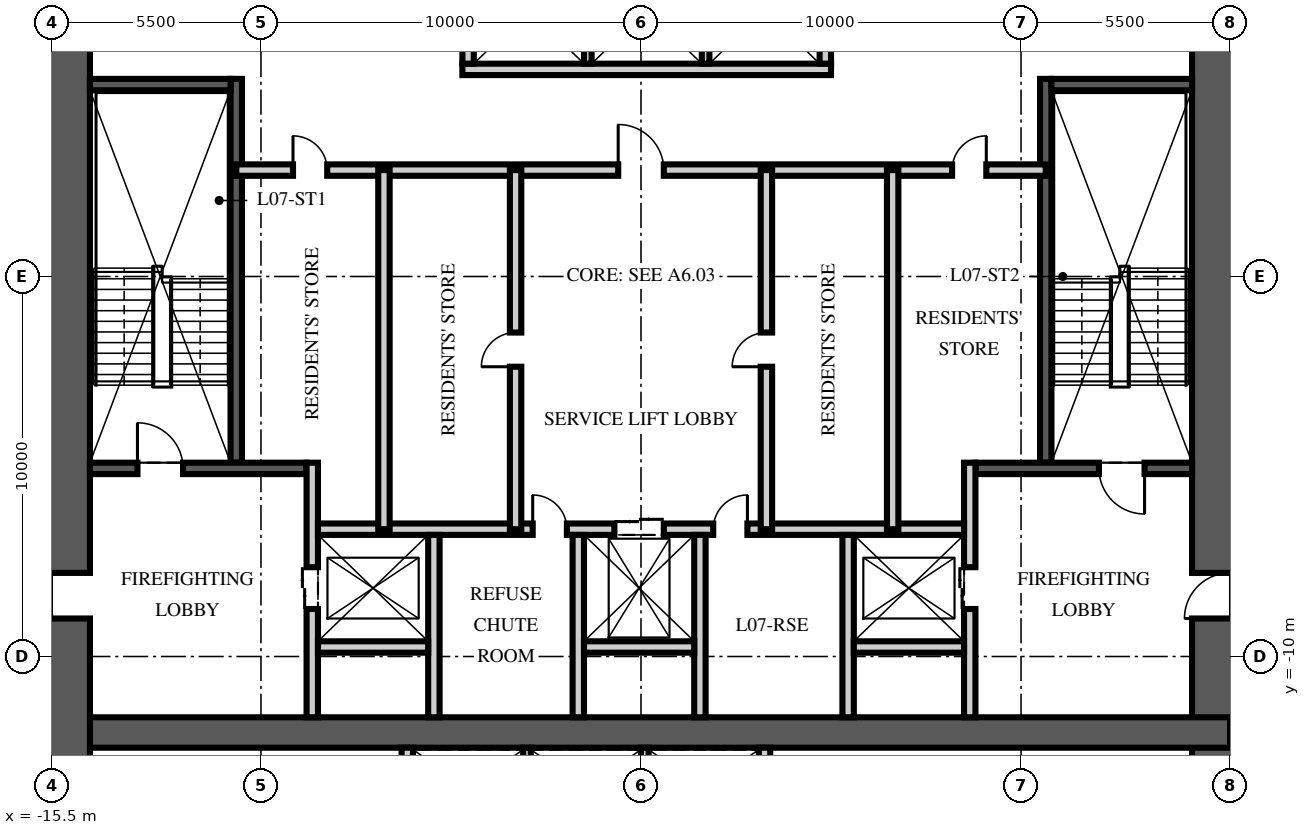
"""IFC4 building model, lengths in metres.
Left out: names, types, materials, properties, quantities, classifications, styles, units other than length and angle.
Written with IfcOpenShell. Run it as: python <this file> out.ifc"""

import sys

from ifc_helpers import new_model, si_unit, direction, frame, frame_2d, origin, place, context, subcontext, project, spatial, rectangle, extrude, element, fill, save


model = new_model("IFC4")
c1 = context("Model", 3, precision=1e-05, world=origin(), true_north=direction((0.0, 1.0)))
c2 = subcontext(c1, "Body", "Model", "MODEL_VIEW")
j1 = project(units=[si_unit("LENGTHUNIT", "METRE"), si_unit("PLANEANGLEUNIT", "RADIAN")], contexts=[c1])
p1 = place(None, origin())
s1 = spatial("IfcSite", under=j1, at=p1, CompositionType="ELEMENT")
p2 = place(p1, origin())
s2 = spatial("IfcBuilding", under=s1, at=p2, CompositionType="ELEMENT")
p3 = place(p2, frame((0.0, 0.0, 32.25)))
s3 = spatial("IfcBuildingStorey", under=s2, at=p3, CompositionType="ELEMENT", Elevation=32.25)
p4 = place(p3, frame((15.5, -15.5, -0.25), z_axis=(0.0, 0.0, 1.0), x_axis=(0.0, 1.0, 0.0)))
e1 = element("IfcWall", 1, at=p4, inside=s3, PredefinedType="SHEAR", context=c2, shape_type="SweptSolid", body=[
    extrude(rectangle(XDim=31.0, YDim=2.0, at=frame_2d((15.5, 0.0))), origin(), (0.0, 0.0, 1.0), 3.75),
])
p5 = place(p4, frame((6.5, 0.0, 0.25)))
e2 = element("IfcOpeningElement", 2, at=p5, cuts=e1, PredefinedType="OPENING", context=c2, shape_type="SweptSolid", body=[
    extrude(rectangle(XDim=1.2, YDim=2.1, at=frame_2d((0.6, 1.05))), frame((0.0, 1.01, 0.0), z_axis=(0.0, -1.0, 0.0), x_axis=(1.0, 0.0, 0.0)), (0.0, 0.0, 1.0), 2.02),
])
p6 = place(p4, frame((23.0, 0.0, 0.25)))
e3 = element("IfcOpeningElement", 3, at=p6, cuts=e1, PredefinedType="OPENING", context=c2, shape_type="SweptSolid", body=[
    extrude(rectangle(XDim=1.8, YDim=2.1, at=frame_2d((0.9, 1.05))), frame((0.0, 1.01, 0.0), z_axis=(0.0, -1.0, 0.0), x_axis=(1.0, 0.0, 0.0)), (0.0, 0.0, 1.0), 2.02),
])
p7 = place(p3, frame((-15.5, -12.0, -0.25), z_axis=(0.0, 0.0, 1.0), x_axis=(1.0, 0.0, 0.0)))
e4 = element("IfcWall", 4, at=p7, inside=s3, PredefinedType="SHEAR", context=c2, shape_type="SweptSolid", body=[
    extrude(rectangle(XDim=31.0, YDim=0.8, at=frame_2d((15.5, 0.0))), origin(), (0.0, 0.0, 1.0), 3.75),
])
p8 = place(p3, frame((-15.5, -15.5, -0.25), z_axis=(0.0, 0.0, 1.0), x_axis=(0.0, 1.0, 0.0)))
e5 = element("IfcWall", 5, at=p8, inside=s3, PredefinedType="SHEAR", context=c2, shape_type="SweptSolid", body=[
    extrude(rectangle(XDim=31.0, YDim=2.0, at=frame_2d((15.5, 0.0))), origin(), (0.0, 0.0, 1.0), 3.75),
])
p9 = place(p8, frame((6.5, 0.0, 0.25)))
e6 = element("IfcOpeningElement", 6, at=p9, cuts=e5, PredefinedType="OPENING", context=c2, shape_type="SweptSolid", body=[
    extrude(rectangle(XDim=1.2, YDim=2.1, at=frame_2d((0.6, 1.05))), frame((0.0, 1.01, 0.0), z_axis=(0.0, -1.0, 0.0), x_axis=(1.0, 0.0, 0.0)), (0.0, 0.0, 1.0), 2.02),
])
p10 = place(p8, frame((23.0, 0.0, 0.25)))
e7 = element("IfcOpeningElement", 7, at=p10, cuts=e5, PredefinedType="OPENING", context=c2, shape_type="SweptSolid", body=[
    extrude(rectangle(XDim=1.8, YDim=2.1, at=frame_2d((0.9, 1.05))), frame((0.0, 1.01, 0.0), z_axis=(0.0, -1.0, 0.0), x_axis=(1.0, 0.0, 0.0)), (0.0, 0.0, 1.0), 2.02),
])
p11 = place(p3, frame((-10.65, -4.9, 0.0), z_axis=(0.0, 0.0, 1.0), x_axis=(0.0, 1.0, 0.0)))
e8 = element("IfcWall", 8, at=p11, inside=s3, PredefinedType="SOLIDWALL", context=c2, shape_type="SweptSolid", body=[
    extrude(rectangle(XDim=10.1, YDim=0.3, at=frame_2d((5.05, 0.0))), origin(), (0.0, 0.0, 1.0), 3.5),
])
p12 = place(p3, frame((-14.5, -5.05, 0.0), z_axis=(0.0, 0.0, 1.0), x_axis=(1.0, 0.0, 0.0)))
e9 = element("IfcWall", 9, at=p12, inside=s3, PredefinedType="SOLIDWALL", context=c2, shape_type="SweptSolid", body=[
    extrude(rectangle(XDim=5.7, YDim=0.3, at=frame_2d((2.85, 0.0))), origin(), (0.0, 0.0, 1.0), 3.5),
])
p13 = place(p12, frame((1.25, 0.0, 0.0)))
e10 = element("IfcOpeningElement", 10, at=p13, cuts=e9, PredefinedType="OPENING", context=c2, shape_type="SweptSolid", body=[
    extrude(rectangle(XDim=1.2, YDim=2.1, at=frame_2d((0.6, 1.05))), frame((0.0, 0.16, 0.0), z_axis=(0.0, -1.0, 0.0), x_axis=(1.0, 0.0, 0.0)), (0.0, 0.0, 1.0), 0.32),
])
p14 = place(p3, frame((-14.5, 5.05, 0.0), z_axis=(0.0, 0.0, 1.0), x_axis=(1.0, 0.0, 0.0)))
e11 = element("IfcWall", 11, at=p14, inside=s3, PredefinedType="SOLIDWALL", context=c2, shape_type="SweptSolid", body=[
    extrude(rectangle(XDim=3.7, YDim=0.3, at=frame_2d((1.85, 0.0))), origin(), (0.0, 0.0, 1.0), 3.5),
])
p15 = place(p3, frame((-8.65, -11.6, 0.0), z_axis=(0.0, 0.0, 1.0), x_axis=(0.0, 1.0, 0.0)))
e12 = element("IfcWall", 12, at=p15, inside=s3, PredefinedType="PARTITIONING", context=c2, shape_type="SweptSolid", body=[
    extrude(rectangle(XDim=6.7, YDim=0.3, at=frame_2d((3.35, 0.0))), origin(), (0.0, 0.0, 1.0), 3.5),
])
p16 = place(p15, frame((2.85, 0.0, 0.0)))
e13 = element("IfcOpeningElement", 13, at=p16, cuts=e12, PredefinedType="OPENING", context=c2, shape_type="SweptSolid", body=[
    extrude(rectangle(XDim=1.1, YDim=2.1, at=frame_2d((0.55, 1.05))), frame((0.0, 0.16, 0.0), z_axis=(0.0, -1.0, 0.0), x_axis=(1.0, 0.0, 0.0)), (0.0, 0.0, 1.0), 0.32),
])
p17 = place(p3, frame((10.65, -4.9, 0.0), z_axis=(0.0, 0.0, 1.0), x_axis=(0.0, 1.0, 0.0)))
e14 = element("IfcWall", 14, at=p17, inside=s3, PredefinedType="SOLIDWALL", context=c2, shape_type="SweptSolid", body=[
    extrude(rectangle(XDim=10.1, YDim=0.3, at=frame_2d((5.05, 0.0))), origin(), (0.0, 0.0, 1.0), 3.5),
])
p18 = place(p3, frame((14.5, -5.05, 0.0), z_axis=(0.0, 0.0, 1.0), x_axis=(-1.0, 0.0, 0.0)))
e15 = element("IfcWall", 15, at=p18, inside=s3, PredefinedType="SOLIDWALL", context=c2, shape_type="SweptSolid", body=[
    extrude(rectangle(XDim=5.7, YDim=0.3, at=frame_2d((2.85, 0.0))), origin(), (0.0, 0.0, 1.0), 3.5),
])
p19 = place(p18, frame((1.25, 0.0, 0.0)))
e16 = element("IfcOpeningElement", 16, at=p19, cuts=e15, PredefinedType="OPENING", context=c2, shape_type="SweptSolid", body=[
    extrude(rectangle(XDim=1.2, YDim=2.1, at=frame_2d((0.6, 1.05))), frame((0.0, 0.16, 0.0), z_axis=(0.0, -1.0, 0.0), x_axis=(1.0, 0.0, 0.0)), (0.0, 0.0, 1.0), 0.32),
])
p20 = place(p3, frame((14.5, 5.05, 0.0), z_axis=(0.0, 0.0, 1.0), x_axis=(-1.0, 0.0, 0.0)))
e17 = element("IfcWall", 17, at=p20, inside=s3, PredefinedType="SOLIDWALL", context=c2, shape_type="SweptSolid", body=[
    extrude(rectangle(XDim=3.7, YDim=0.3, at=frame_2d((1.85, 0.0))), origin(), (0.0, 0.0, 1.0), 3.5),
])
p21 = place(p3, frame((8.65, -11.6, 0.0), z_axis=(0.0, 0.0, 1.0), x_axis=(0.0, 1.0, 0.0)))
e18 = element("IfcWall", 18, at=p21, inside=s3, PredefinedType="PARTITIONING", context=c2, shape_type="SweptSolid", body=[
    extrude(rectangle(XDim=6.7, YDim=0.3, at=frame_2d((3.35, 0.0))), origin(), (0.0, 0.0, 1.0), 3.5),
])
p22 = place(p21, frame((2.85, 0.0, 0.0)))
e19 = element("IfcOpeningElement", 19, at=p22, cuts=e18, PredefinedType="OPENING", context=c2, shape_type="SweptSolid", body=[
    extrude(rectangle(XDim=1.1, YDim=2.1, at=frame_2d((0.55, 1.05))), frame((0.0, 0.16, 0.0), z_axis=(0.0, -1.0, 0.0), x_axis=(1.0, 0.0, 0.0)), (0.0, 0.0, 1.0), 0.32),
])
p23 = place(p3, frame((-8.5, -6.65, 0.0), z_axis=(0.0, 0.0, 1.0), x_axis=(1.0, 0.0, 0.0)))
e20 = element("IfcWall", 20, at=p23, inside=s3, PredefinedType="PARTITIONING", context=c2, shape_type="SweptSolid", body=[
    extrude(rectangle(XDim=17.0, YDim=0.3, at=frame_2d((8.5, 0.0))), origin(), (0.0, 0.0, 1.0), 3.5),
])
p24 = place(p23, frame((7.8, 0.0, 0.0)))
e21 = element("IfcOpeningElement", 21, at=p24, cuts=e20, PredefinedType="OPENING", context=c2, shape_type="SweptSolid", body=[
    extrude(rectangle(XDim=1.3, YDim=2.4, at=frame_2d((0.65, 1.2))), frame((0.0, 0.16, 0.0), z_axis=(0.0, -1.0, 0.0), x_axis=(1.0, 0.0, 0.0)), (0.0, 0.0, 1.0), 0.32),
])
p25 = place(p23, frame((5.65, 0.0, 0.0)))
e22 = element("IfcOpeningElement", 22, at=p25, cuts=e20, PredefinedType="OPENING", context=c2, shape_type="SweptSolid", body=[
    extrude(rectangle(XDim=0.9, YDim=2.1, at=frame_2d((0.45, 1.05))), frame((0.0, 0.16, 0.0), z_axis=(0.0, -1.0, 0.0), x_axis=(1.0, 0.0, 0.0)), (0.0, 0.0, 1.0), 0.32),
])
p26 = place(p23, frame((10.4, 0.0, 0.0)))
e23 = element("IfcOpeningElement", 23, at=p26, cuts=e20, PredefinedType="OPENING", context=c2, shape_type="SweptSolid", body=[
    extrude(rectangle(XDim=0.9, YDim=2.1, at=frame_2d((0.45, 1.05))), frame((0.0, 0.16, 0.0), z_axis=(0.0, -1.0, 0.0), x_axis=(1.0, 0.0, 0.0)), (0.0, 0.0, 1.0), 0.32),
])
for number, where, z_axis, x_axis in (
    (24, (-5.45, -11.6, 0.0), (0.0, 0.0, 1.0), (0.0, 1.0, 0.0)),
    (25, (-1.65, -11.6, 0.0), (0.0, 0.0, 1.0), (0.0, 1.0, 0.0)),
    (26, (1.55, -11.6, 0.0), (0.0, 0.0, 1.0), (0.0, 1.0, 0.0)),
    (27, (5.45, -11.6, 0.0), (0.0, 0.0, 1.0), (0.0, 1.0, 0.0)),
):
    element("IfcWall", number, at=place(p3, frame(where, z_axis=z_axis, x_axis=x_axis)), inside=s3, PredefinedType="PARTITIONING", context=c2, shape_type="SweptSolid", body=[
        extrude(rectangle(XDim=4.8, YDim=0.3, at=frame_2d((2.4, 0.0))), origin(), (0.0, 0.0, 1.0), 3.5),
    ])
for number, where, z_axis, x_axis in (
    (28, (-8.5, -9.75, 0.0), (0.0, 0.0, 1.0), (1.0, 0.0, 0.0)),
    (29, (-1.5, -9.75, 0.0), (0.0, 0.0, 1.0), (1.0, 0.0, 0.0)),
    (30, (5.6, -9.75, 0.0), (0.0, 0.0, 1.0), (1.0, 0.0, 0.0)),
):
    element("IfcWall", number, at=place(p3, frame(where, z_axis=z_axis, x_axis=x_axis)), inside=s3, PredefinedType="PARTITIONING", context=c2, shape_type="SweptSolid", body=[
        extrude(rectangle(XDim=2.9, YDim=0.3, at=frame_2d((1.45, 0.0))), origin(), (0.0, 0.0, 1.0), 3.5),
    ])
p27 = place(p3, frame((-4.7, 5.45, 0.0), z_axis=(0.0, 0.0, 1.0), x_axis=(1.0, 0.0, 0.0)))
e31 = element("IfcWall", 31, at=p27, inside=s3, PredefinedType="PARTITIONING", context=c2, shape_type="SweptSolid", body=[
    extrude(rectangle(XDim=9.7, YDim=0.3, at=frame_2d((4.85, 0.0))), origin(), (0.0, 0.0, 1.0), 3.5),
])
for number, where, z_axis, x_axis in (
    (32, (-4.55, 5.6, 0.0), (0.0, 0.0, 1.0), (0.0, 1.0, 0.0)),
    (33, (4.85, 5.6, 0.0), (0.0, 0.0, 1.0), (0.0, 1.0, 0.0)),
):
    element("IfcWall", number, at=place(p3, frame(where, z_axis=z_axis, x_axis=x_axis)), inside=s3, PredefinedType="PARTITIONING", context=c2, shape_type="SweptSolid", body=[
        extrude(rectangle(XDim=2.8, YDim=0.3, at=frame_2d((1.4, 0.0))), origin(), (0.0, 0.0, 1.0), 3.5),
    ])
for number, where, z_axis, x_axis in (
    (34, (-1.4, 5.6, 0.0), (0.0, 0.0, 1.0), (0.0, 1.0, 0.0)),
    (35, (1.7, 5.6, 0.0), (0.0, 0.0, 1.0), (0.0, 1.0, 0.0)),
):
    element("IfcWall", number, at=place(p3, frame(where, z_axis=z_axis, x_axis=x_axis)), inside=s3, PredefinedType="PARTITIONING", context=c2, shape_type="SweptSolid", body=[
        extrude(rectangle(XDim=2.8, YDim=0.2, at=frame_2d((1.4, 0.0))), origin(), (0.0, 0.0, 1.0), 3.5),
    ])
for number, where, z_axis, x_axis in (
    (36, (-6.15, -14.5, 0.0), (0.0, 0.0, 1.0), (0.0, 1.0, 0.0)),
    (37, (3.25, -14.5, 0.0), (0.0, 0.0, 1.0), (0.0, 1.0, 0.0)),
):
    element("IfcWall", number, at=place(p3, frame(where, z_axis=z_axis, x_axis=x_axis)), inside=s3, PredefinedType="PARTITIONING", context=c2, shape_type="SweptSolid", body=[
        extrude(rectangle(XDim=2.1, YDim=0.3, at=frame_2d((1.05, 0.0))), origin(), (0.0, 0.0, 1.0), 3.5),
    ])
for number, where, z_axis, x_axis in (
    (38, (-3.0, -14.5, 0.0), (0.0, 0.0, 1.0), (0.0, 1.0, 0.0)),
    (39, (0.1, -14.5, 0.0), (0.0, 0.0, 1.0), (0.0, 1.0, 0.0)),
):
    element("IfcWall", number, at=place(p3, frame(where, z_axis=z_axis, x_axis=x_axis)), inside=s3, PredefinedType="PARTITIONING", context=c2, shape_type="SweptSolid", body=[
        extrude(rectangle(XDim=2.1, YDim=0.2, at=frame_2d((1.05, 0.0))), origin(), (0.0, 0.0, 1.0), 3.5),
    ])
p28 = place(p3, frame((-10.65, 2.8, 0.0), z_axis=(0.0, 0.0, 1.0), x_axis=(1.0, 0.0, 0.0)))
e40 = element("IfcWall", 40, at=p28, inside=s3, PredefinedType="PARTITIONING", context=c2, shape_type="SweptSolid", body=[
    extrude(rectangle(XDim=21.3, YDim=0.3, at=frame_2d((10.65, 0.0))), origin(), (0.0, 0.0, 1.0), 3.5),
])
p29 = place(p28, frame((10.05, 0.0, 0.0)))
e41 = element("IfcOpeningElement", 41, at=p29, cuts=e40, PredefinedType="OPENING", context=c2, shape_type="SweptSolid", body=[
    extrude(rectangle(XDim=1.2, YDim=2.1, at=frame_2d((0.6, 1.05))), frame((0.0, 0.16, 0.0), z_axis=(0.0, -1.0, 0.0), x_axis=(1.0, 0.0, 0.0)), (0.0, 0.0, 1.0), 0.32),
])
p30 = place(p28, frame((1.493, 0.0, 0.0)))
e42 = element("IfcOpeningElement", 42, at=p30, cuts=e40, PredefinedType="OPENING", context=c2, shape_type="SweptSolid", body=[
    extrude(rectangle(XDim=0.9, YDim=2.1, at=frame_2d((0.45, 1.05))), frame((0.0, 0.16, 0.0), z_axis=(0.0, -1.0, 0.0), x_axis=(1.0, 0.0, 0.0)), (0.0, 0.0, 1.0), 0.32),
])
p31 = place(p28, frame((18.836, 0.0, 0.0)))
e43 = element("IfcOpeningElement", 43, at=p31, cuts=e40, PredefinedType="OPENING", context=c2, shape_type="SweptSolid", body=[
    extrude(rectangle(XDim=0.9, YDim=2.1, at=frame_2d((0.45, 1.05))), frame((0.0, 0.16, 0.0), z_axis=(0.0, -1.0, 0.0), x_axis=(1.0, 0.0, 0.0)), (0.0, 0.0, 1.0), 0.32),
])
p32 = place(p3, frame((-3.3, -6.65, 0.0), z_axis=(0.0, 0.0, 1.0), x_axis=(0.0, 1.0, 0.0)))
e44 = element("IfcWall", 44, at=p32, inside=s3, PredefinedType="PARTITIONING", context=c2, shape_type="SweptSolid", body=[
    extrude(rectangle(XDim=9.45, YDim=0.3, at=frame_2d((4.725, 0.0))), origin(), (0.0, 0.0, 1.0), 3.5),
])
p33 = place(p32, frame((4.275, 0.0, 0.0)))
e45 = element("IfcOpeningElement", 45, at=p33, cuts=e44, PredefinedType="OPENING", context=c2, shape_type="SweptSolid", body=[
    extrude(rectangle(XDim=0.9, YDim=2.1, at=frame_2d((0.45, 1.05))), frame((0.0, 0.16, 0.0), z_axis=(0.0, -1.0, 0.0), x_axis=(1.0, 0.0, 0.0)), (0.0, 0.0, 1.0), 0.32),
])
p34 = place(p3, frame((3.3, -6.65, 0.0), z_axis=(0.0, 0.0, 1.0), x_axis=(0.0, 1.0, 0.0)))
e46 = element("IfcWall", 46, at=p34, inside=s3, PredefinedType="PARTITIONING", context=c2, shape_type="SweptSolid", body=[
    extrude(rectangle(XDim=9.45, YDim=0.3, at=frame_2d((4.725, 0.0))), origin(), (0.0, 0.0, 1.0), 3.5),
])
p35 = place(p34, frame((4.275, 0.0, 0.0)))
e47 = element("IfcOpeningElement", 47, at=p35, cuts=e46, PredefinedType="OPENING", context=c2, shape_type="SweptSolid", body=[
    extrude(rectangle(XDim=0.9, YDim=2.1, at=frame_2d((0.45, 1.05))), frame((0.0, 0.16, 0.0), z_axis=(0.0, -1.0, 0.0), x_axis=(1.0, 0.0, 0.0)), (0.0, 0.0, 1.0), 0.32),
])
for number, where, z_axis, x_axis in (
    (48, (-6.764, -6.65, 0.0), (0.0, 0.0, 1.0), (0.0, 1.0, 0.0)),
    (49, (6.622, -6.65, 0.0), (0.0, 0.0, 1.0), (0.0, 1.0, 0.0)),
):
    element("IfcWall", number, at=place(p3, frame(where, z_axis=z_axis, x_axis=x_axis)), inside=s3, PredefinedType="PARTITIONING", context=c2, shape_type="SweptSolid", body=[
        extrude(rectangle(XDim=9.45, YDim=0.3, at=frame_2d((4.725, 0.0))), origin(), (0.0, 0.0, 1.0), 3.5),
    ])
p36 = place(p13, origin())
e50 = element("IfcDoor", 50, at=p36, inside=s3, OperationType="SINGLE_SWING_LEFT", PredefinedType="DOOR", context=c2, shape_type="SweptSolid", body=[
    extrude(rectangle(XDim=1.2, YDim=2.1, at=frame_2d((0.6, 1.05))), frame((0.0, 0.025, 0.0), z_axis=(0.0, -1.0, 0.0), x_axis=(1.0, 0.0, 0.0)), (0.0, 0.0, 1.0), 0.05),
])
fill(e10, e50)
p37 = place(p9, origin())
e51 = element("IfcDoor", 51, at=p37, inside=s3, OperationType="SINGLE_SWING_LEFT", PredefinedType="DOOR", context=c2, shape_type="SweptSolid", body=[
    extrude(rectangle(XDim=1.2, YDim=2.1, at=frame_2d((0.6, 1.05))), frame((0.0, 0.025, 0.0), z_axis=(0.0, -1.0, 0.0), x_axis=(1.0, 0.0, 0.0)), (0.0, 0.0, 1.0), 0.05),
])
fill(e6, e51)
p38 = place(p19, origin())
e52 = element("IfcDoor", 52, at=p38, inside=s3, OperationType="SINGLE_SWING_LEFT", PredefinedType="DOOR", context=c2, shape_type="SweptSolid", body=[
    extrude(rectangle(XDim=1.2, YDim=2.1, at=frame_2d((0.6, 1.05))), frame((0.0, 0.025, 0.0), z_axis=(0.0, -1.0, 0.0), x_axis=(1.0, 0.0, 0.0)), (0.0, 0.0, 1.0), 0.05),
])
fill(e16, e52)
p39 = place(p5, origin())
e53 = element("IfcDoor", 53, at=p39, inside=s3, OperationType="SINGLE_SWING_LEFT", PredefinedType="DOOR", context=c2, shape_type="SweptSolid", body=[
    extrude(rectangle(XDim=1.2, YDim=2.1, at=frame_2d((0.6, 1.05))), frame((0.0, 0.025, 0.0), z_axis=(0.0, -1.0, 0.0), x_axis=(1.0, 0.0, 0.0)), (0.0, 0.0, 1.0), 0.05),
])
fill(e2, e53)
p40 = place(p16, origin())
e54 = element("IfcDoor", 54, at=p40, inside=s3, OperationType="DOUBLE_DOOR_SLIDING", PredefinedType="DOOR", context=c2, shape_type="SweptSolid", body=[
    extrude(rectangle(XDim=1.1, YDim=2.1, at=frame_2d((0.55, 1.05))), frame((0.0, 0.025, 0.0), z_axis=(0.0, -1.0, 0.0), x_axis=(1.0, 0.0, 0.0)), (0.0, 0.0, 1.0), 0.05),
])
fill(e13, e54)
p41 = place(p22, origin())
e55 = element("IfcDoor", 55, at=p41, inside=s3, OperationType="DOUBLE_DOOR_SLIDING", PredefinedType="DOOR", context=c2, shape_type="SweptSolid", body=[
    extrude(rectangle(XDim=1.1, YDim=2.1, at=frame_2d((0.55, 1.05))), frame((0.0, 0.025, 0.0), z_axis=(0.0, -1.0, 0.0), x_axis=(1.0, 0.0, 0.0)), (0.0, 0.0, 1.0), 0.05),
])
fill(e19, e55)
p42 = place(p24, origin())
e56 = element("IfcDoor", 56, at=p42, inside=s3, OperationType="DOUBLE_DOOR_SLIDING", PredefinedType="DOOR", context=c2, shape_type="SweptSolid", body=[
    extrude(rectangle(XDim=1.3, YDim=2.4, at=frame_2d((0.65, 1.2))), frame((0.0, 0.025, 0.0), z_axis=(0.0, -1.0, 0.0), x_axis=(1.0, 0.0, 0.0)), (0.0, 0.0, 1.0), 0.05),
])
fill(e21, e56)
p43 = place(p29, origin())
e57 = element("IfcDoor", 57, at=p43, inside=s3, OperationType="SINGLE_SWING_LEFT", PredefinedType="DOOR", context=c2, shape_type="SweptSolid", body=[
    extrude(rectangle(XDim=1.2, YDim=2.1, at=frame_2d((0.6, 1.05))), frame((0.0, 0.025, 0.0), z_axis=(0.0, -1.0, 0.0), x_axis=(1.0, 0.0, 0.0)), (0.0, 0.0, 1.0), 0.05),
])
fill(e41, e57)
p44 = place(p25, origin())
e58 = element("IfcDoor", 58, at=p44, inside=s3, OperationType="SINGLE_SWING_LEFT", PredefinedType="DOOR", context=c2, shape_type="SweptSolid", body=[
    extrude(rectangle(XDim=0.9, YDim=2.1, at=frame_2d((0.45, 1.05))), frame((0.0, 0.025, 0.0), z_axis=(0.0, -1.0, 0.0), x_axis=(1.0, 0.0, 0.0)), (0.0, 0.0, 1.0), 0.05),
])
fill(e22, e58)
p45 = place(p26, origin())
e59 = element("IfcDoor", 59, at=p45, inside=s3, OperationType="SINGLE_SWING_RIGHT", PredefinedType="DOOR", context=c2, shape_type="SweptSolid", body=[
    extrude(rectangle(XDim=0.9, YDim=2.1, at=frame_2d((0.45, 1.05))), frame((0.0, 0.025, 0.0), z_axis=(0.0, -1.0, 0.0), x_axis=(1.0, 0.0, 0.0)), (0.0, 0.0, 1.0), 0.05),
])
fill(e23, e59)
p46 = place(p33, origin())
e60 = element("IfcDoor", 60, at=p46, inside=s3, OperationType="SINGLE_SWING_LEFT", PredefinedType="DOOR", context=c2, shape_type="SweptSolid", body=[
    extrude(rectangle(XDim=0.9, YDim=2.1, at=frame_2d((0.45, 1.05))), frame((0.0, 0.025, 0.0), z_axis=(0.0, -1.0, 0.0), x_axis=(1.0, 0.0, 0.0)), (0.0, 0.0, 1.0), 0.05),
])
fill(e45, e60)
p47 = place(p30, origin())
e61 = element("IfcDoor", 61, at=p47, inside=s3, OperationType="SINGLE_SWING_LEFT", PredefinedType="DOOR", context=c2, shape_type="SweptSolid", body=[
    extrude(rectangle(XDim=0.9, YDim=2.1, at=frame_2d((0.45, 1.05))), frame((0.0, 0.025, 0.0), z_axis=(0.0, -1.0, 0.0), x_axis=(1.0, 0.0, 0.0)), (0.0, 0.0, 1.0), 0.05),
])
fill(e42, e61)
p48 = place(p35, origin())
e62 = element("IfcDoor", 62, at=p48, inside=s3, OperationType="SINGLE_SWING_LEFT", PredefinedType="DOOR", context=c2, shape_type="SweptSolid", body=[
    extrude(rectangle(XDim=0.9, YDim=2.1, at=frame_2d((0.45, 1.05))), frame((0.0, 0.025, 0.0), z_axis=(0.0, -1.0, 0.0), x_axis=(1.0, 0.0, 0.0)), (0.0, 0.0, 1.0), 0.05),
])
fill(e47, e62)
p49 = place(p31, origin())
e63 = element("IfcDoor", 63, at=p49, inside=s3, OperationType="SINGLE_SWING_RIGHT", PredefinedType="DOOR", context=c2, shape_type="SweptSolid", body=[
    extrude(rectangle(XDim=0.9, YDim=2.1, at=frame_2d((0.45, 1.05))), frame((0.0, 0.025, 0.0), z_axis=(0.0, -1.0, 0.0), x_axis=(1.0, 0.0, 0.0)), (0.0, 0.0, 1.0), 0.05),
])
fill(e43, e63)
save(model, sys.argv[1])
